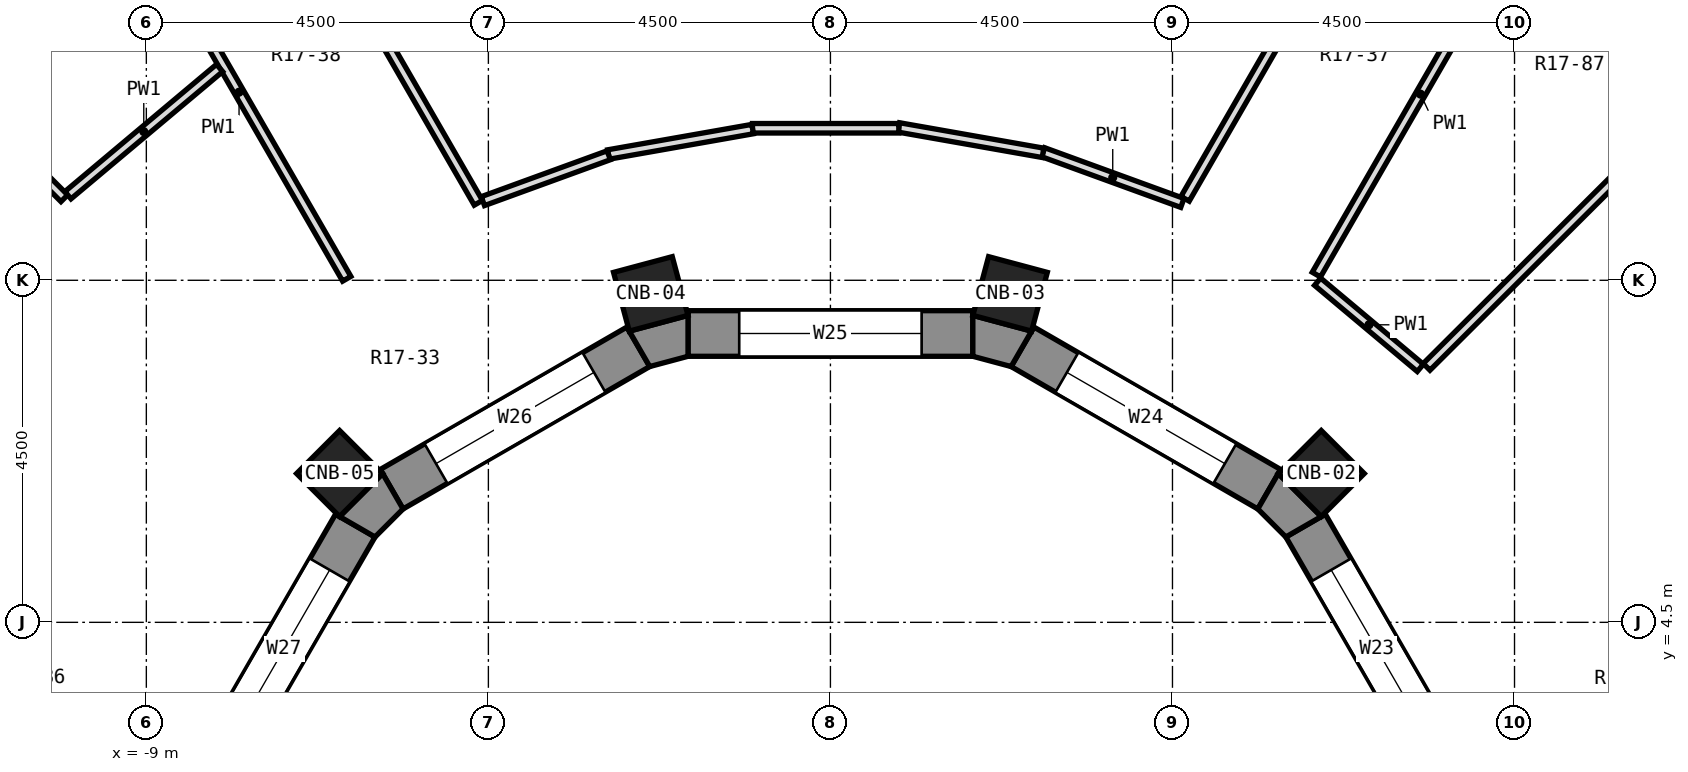
"""IFC4 building model, lengths in metres.
Left out: names, types, materials, properties, quantities, classifications, styles, units other than length and angle.
Written with IfcOpenShell. Run it as: python <this file> out.ifc"""

import sys

from ifc_helpers import new_model, si_unit, direction, frame, frame_2d, origin, origin_2d, place, context, subcontext, project, spatial, polyline, rectangle, outline, extrude, element, fill, save


model = new_model("IFC4")
c1 = context("Model", 3, precision=1e-05, world=origin(), true_north=direction((0.0, 1.0)))
c2 = subcontext(c1, "Body", "Model", "MODEL_VIEW")
j1 = project(units=[si_unit("LENGTHUNIT", "METRE"), si_unit("PLANEANGLEUNIT", "RADIAN")], contexts=[c1])
p1 = place(None, origin())
s1 = spatial("IfcSite", under=j1, at=p1, CompositionType="ELEMENT")
p2 = place(p1, origin())
s2 = spatial("IfcBuilding", under=s1, at=p2, CompositionType="ELEMENT")
p3 = place(p2, frame((0.0, 0.0, 91.9)))
s3 = spatial("IfcBuildingStorey", under=s2, at=p3, CompositionType="ELEMENT", Elevation=91.9)
for number, where, z_axis, x_axis in (
    (1, (6.458, 6.458, 0.0), (0.0, 0.0, 1.0), (0.707, 0.707, 0.0)),
    (2, (2.364, 8.821, 0.0), (0.0, 0.0, 1.0), (0.259, 0.966, 0.0)),
    (3, (-2.364, 8.821, 0.0), (0.0, 0.0, 1.0), (-0.259, 0.966, 0.0)),
    (4, (-6.458, 6.458, 0.0), (0.0, 0.0, 1.0), (-0.707, 0.707, 0.0)),
):
    element("IfcColumn", number, at=place(p3, frame(where, z_axis=z_axis, x_axis=x_axis)), inside=s3, PredefinedType="COLUMN", context=c2, shape_type="SweptSolid", body=[
        extrude(rectangle(XDim=0.8, YDim=0.8, at=origin_2d()), origin(), (0.0, 0.0, 1.0), 3.3),
    ])
p4 = place(p3, frame((8.125, 2.527, 0.0), z_axis=(0.0, 0.0, 1.0), x_axis=(-0.499964958637, 0.86604563398, 0.0)))
e5 = element("IfcWall", 5, at=p4, inside=s3, PredefinedType="SOLIDWALL", context=c2, shape_type="SweptSolid", body=[
    extrude(rectangle(XDim=3.747, YDim=0.6, at=frame_2d((1.874, 0.0))), origin(), (0.0, 0.0, 1.0), 2.8),
])
p5 = place(p4, frame((0.674, 0.0, 0.9)))
e6 = element("IfcOpeningElement", 6, at=p5, cuts=e5, PredefinedType="OPENING", context=c2, shape_type="SweptSolid", body=[
    extrude(rectangle(XDim=2.4, YDim=1.8, at=frame_2d((1.2, 0.9))), frame((0.0, 0.312, 0.0), z_axis=(0.0, -1.0, 0.0), x_axis=(1.0, 0.0, 0.0)), (0.0, 0.0, 1.0), 0.624),
])
p6 = place(p3, frame((5.773, 6.251, 0.0), z_axis=(0.0, 0.0, 1.0), x_axis=(-0.86604563398, 0.499964958637, 0.0)))
e7 = element("IfcWall", 7, at=p6, inside=s3, PredefinedType="SOLIDWALL", context=c2, shape_type="SweptSolid", body=[
    extrude(rectangle(XDim=3.747, YDim=0.6, at=frame_2d((1.874, 0.0))), origin(), (0.0, 0.0, 1.0), 2.8),
])
p7 = place(p6, frame((0.674, 0.0, 0.9)))
e8 = element("IfcOpeningElement", 8, at=p7, cuts=e7, PredefinedType="OPENING", context=c2, shape_type="SweptSolid", body=[
    extrude(rectangle(XDim=2.4, YDim=1.8, at=frame_2d((1.2, 0.9))), frame((0.0, 0.312, 0.0), z_axis=(0.0, -1.0, 0.0), x_axis=(1.0, 0.0, 0.0)), (0.0, 0.0, 1.0), 0.624),
])
p8 = place(p3, frame((1.874, 8.3, 0.0), z_axis=(0.0, 0.0, 1.0), x_axis=(-1.0, 0.0, 0.0)))
e9 = element("IfcWall", 9, at=p8, inside=s3, PredefinedType="SOLIDWALL", context=c2, shape_type="SweptSolid", body=[
    extrude(rectangle(XDim=3.748, YDim=0.6, at=frame_2d((1.874, 0.0))), origin(), (0.0, 0.0, 1.0), 2.8),
])
p9 = place(p8, frame((0.674, 0.0, 0.9)))
e10 = element("IfcOpeningElement", 10, at=p9, cuts=e9, PredefinedType="OPENING", context=c2, shape_type="SweptSolid", body=[
    extrude(rectangle(XDim=2.4, YDim=1.8, at=frame_2d((1.2, 0.9))), frame((0.0, 0.312, 0.0), z_axis=(0.0, -1.0, 0.0), x_axis=(1.0, 0.0, 0.0)), (0.0, 0.0, 1.0), 0.624),
])
p10 = place(p3, frame((-2.527, 8.125, 0.0), z_axis=(0.0, 0.0, 1.0), x_axis=(-0.86604563398, -0.499964958637, 0.0)))
e11 = element("IfcWall", 11, at=p10, inside=s3, PredefinedType="SOLIDWALL", context=c2, shape_type="SweptSolid", body=[
    extrude(rectangle(XDim=3.747, YDim=0.6, at=frame_2d((1.874, 0.0))), origin(), (0.0, 0.0, 1.0), 2.8),
])
p11 = place(p10, frame((0.674, 0.0, 0.9)))
e12 = element("IfcOpeningElement", 12, at=p11, cuts=e11, PredefinedType="OPENING", context=c2, shape_type="SweptSolid", body=[
    extrude(rectangle(XDim=2.4, YDim=1.8, at=frame_2d((1.2, 0.9))), frame((0.0, 0.312, 0.0), z_axis=(0.0, -1.0, 0.0), x_axis=(1.0, 0.0, 0.0)), (0.0, 0.0, 1.0), 0.624),
])
p12 = place(p3, frame((-6.251, 5.773, 0.0), z_axis=(0.0, 0.0, 1.0), x_axis=(-0.499964958637, -0.86604563398, 0.0)))
e13 = element("IfcWall", 13, at=p12, inside=s3, PredefinedType="SOLIDWALL", context=c2, shape_type="SweptSolid", body=[
    extrude(rectangle(XDim=3.747, YDim=0.6, at=frame_2d((1.874, 0.0))), origin(), (0.0, 0.0, 1.0), 2.8),
])
p13 = place(p12, frame((0.674, 0.0, 0.9)))
e14 = element("IfcOpeningElement", 14, at=p13, cuts=e13, PredefinedType="OPENING", context=c2, shape_type="SweptSolid", body=[
    extrude(rectangle(XDim=2.4, YDim=1.8, at=frame_2d((1.2, 0.9))), frame((0.0, 0.312, 0.0), z_axis=(0.0, -1.0, 0.0), x_axis=(1.0, 0.0, 0.0)), (0.0, 0.0, 1.0), 0.624),
])
p14 = place(p3, origin())
e15 = element("IfcWall", 15, at=p14, inside=s3, PredefinedType="SOLIDWALL", context=c2, shape_type="SweptSolid", body=[
    extrude(outline(polyline([(5.892, 6.458), (5.623, 5.991), (5.991, 5.623), (6.458, 5.892), (5.892, 6.458)])), origin(), (0.0, 0.0, 1.0), 2.8),
])
p15 = place(p3, origin())
e16 = element("IfcWall", 16, at=p15, inside=s3, PredefinedType="SOLIDWALL", context=c2, shape_type="SweptSolid", body=[
    extrude(outline(polyline([(1.874, 8.538), (1.874, 8.0), (2.377, 7.865), (2.646, 8.331), (1.874, 8.538)])), origin(), (0.0, 0.0, 1.0), 2.8),
])
p16 = place(p3, origin())
e17 = element("IfcWall", 17, at=p16, inside=s3, PredefinedType="SOLIDWALL", context=c2, shape_type="SweptSolid", body=[
    extrude(outline(polyline([(-2.646, 8.331), (-2.377, 7.865), (-1.874, 8.0), (-1.874, 8.538), (-2.646, 8.331)])), origin(), (0.0, 0.0, 1.0), 2.8),
])
p17 = place(p3, origin())
e18 = element("IfcWall", 18, at=p17, inside=s3, PredefinedType="SOLIDWALL", context=c2, shape_type="SweptSolid", body=[
    extrude(outline(polyline([(-6.458, 5.892), (-5.991, 5.623), (-5.623, 5.991), (-5.892, 6.458), (-6.458, 5.892)])), origin(), (0.0, 0.0, 1.0), 2.8),
])
p18 = place(p3, frame((-9.197, 13.93, 0.0), z_axis=(0.0, 0.0, 1.0), x_axis=(0.499811918813, -0.86613396528, 0.0)))
e19 = element("IfcWall", 19, at=p18, inside=s3, PredefinedType="PARTITIONING", context=c2, shape_type="SweptSolid", body=[
    extrude(rectangle(XDim=5.67, YDim=0.125, at=frame_2d((2.835, 0.0))), origin(), (0.0, 0.0, 1.0), 2.8),
])
p19 = place(p3, frame((-7.434, 14.876, 0.0), z_axis=(0.0, 0.0, 1.0), x_axis=(0.499750096908, -0.866169637335, 0.0)))
e20 = element("IfcWall", 20, at=p19, inside=s3, PredefinedType="PARTITIONING", context=c2, shape_type="SweptSolid", body=[
    extrude(rectangle(XDim=5.607, YDim=0.125, at=frame_2d((2.803, 0.0))), origin(), (0.0, 0.0, 1.0), 2.8),
])
p20 = place(p19, frame((0.837, 0.0, 0.0)))
e21 = element("IfcOpeningElement", 21, at=p20, cuts=e20, PredefinedType="OPENING", context=c2, shape_type="SweptSolid", body=[
    extrude(rectangle(XDim=1.0, YDim=2.1, at=frame_2d((0.5, 1.05))), frame((0.0, 0.074, 0.0), z_axis=(0.0, -1.0, 0.0), x_axis=(1.0, 0.0, 0.0)), (0.0, 0.0, 1.0), 0.149),
])
p21 = place(p3, frame((-13.079, 13.079, 0.0), z_axis=(0.0, 0.0, 1.0), x_axis=(0.707106781187, -0.707106781187, 0.0)))
e22 = element("IfcWall", 22, at=p21, inside=s3, PredefinedType="PARTITIONING", context=c2, shape_type="SweptSolid", body=[
    extrude(rectangle(XDim=4.242, YDim=0.125, at=frame_2d((2.121, 0.0))), origin(), (0.0, 0.0, 1.0), 2.8),
])
p22 = place(p3, frame((6.409, 8.981, 0.0), z_axis=(0.0, 0.0, 1.0), x_axis=(0.766209131969, -0.642591290081, 0.0)))
e23 = element("IfcWall", 23, at=p22, inside=s3, PredefinedType="PARTITIONING", context=c2, shape_type="SweptSolid", body=[
    extrude(rectangle(XDim=1.764, YDim=0.125, at=frame_2d((0.882, 0.0))), origin(), (0.0, 0.0, 1.0), 2.8),
])
p23 = place(p3, frame((2.798, 10.685, 0.0), z_axis=(0.0, 0.0, 1.0), x_axis=(0.939595877431, -0.342285826635, 0.0)))
e24 = element("IfcWall", 24, at=p23, inside=s3, PredefinedType="PARTITIONING", context=c2, shape_type="SweptSolid", body=[
    extrude(rectangle(XDim=1.95, YDim=0.125, at=frame_2d((0.975, 0.0))), origin(), (0.0, 0.0, 1.0), 2.8),
])
p24 = place(p3, frame((0.899, 11.011, 0.0), z_axis=(0.0, 0.0, 1.0), x_axis=(0.984830733923, -0.173517795977, 0.0)))
e25 = element("IfcWall", 25, at=p24, inside=s3, PredefinedType="PARTITIONING", context=c2, shape_type="SweptSolid", body=[
    extrude(rectangle(XDim=1.926, YDim=0.125, at=frame_2d((0.963, 0.0))), origin(), (0.0, 0.0, 1.0), 2.8),
])
p25 = place(p3, frame((-1.025, 11.0, 0.0), z_axis=(0.0, 0.0, 1.0), x_axis=(1.0, 0.0, 0.0)))
e26 = element("IfcWall", 26, at=p25, inside=s3, PredefinedType="PARTITIONING", context=c2, shape_type="SweptSolid", body=[
    extrude(rectangle(XDim=1.925, YDim=0.125, at=frame_2d((0.962, 0.0))), origin(), (0.0, 0.0, 1.0), 2.8),
])
p26 = place(p3, frame((-2.92, 10.655, 0.0), z_axis=(0.0, 0.0, 1.0), x_axis=(0.98482691703, 0.173539458027, 0.0)))
e27 = element("IfcWall", 27, at=p26, inside=s3, PredefinedType="PARTITIONING", context=c2, shape_type="SweptSolid", body=[
    extrude(rectangle(XDim=1.926, YDim=0.125, at=frame_2d((0.963, 0.0))), origin(), (0.0, 0.0, 1.0), 2.8),
])
p27 = place(p3, frame((-4.572, 10.042, 0.0), z_axis=(0.0, 0.0, 1.0), x_axis=(0.939578855371, 0.342332549635, 0.0)))
e28 = element("IfcWall", 28, at=p27, inside=s3, PredefinedType="PARTITIONING", context=c2, shape_type="SweptSolid", body=[
    extrude(rectangle(XDim=1.762, YDim=0.125, at=frame_2d((0.881, 0.0))), origin(), (0.0, 0.0, 1.0), 2.8),
])
p28 = place(p3, frame((-10.031, 10.119, 0.0), z_axis=(0.0, 0.0, 1.0), x_axis=(0.766096242005, 0.642725873126, 0.0)))
e29 = element("IfcWall", 29, at=p28, inside=s3, PredefinedType="PARTITIONING", context=c2, shape_type="SweptSolid", body=[
    extrude(rectangle(XDim=2.604, YDim=0.125, at=frame_2d((1.302, 0.0))), origin(), (0.0, 0.0, 1.0), 2.8),
])
p29 = place(p3, frame((7.844, 7.861, 0.0), z_axis=(0.0, 0.0, 1.0), x_axis=(0.708356490253, 0.705854859526, 0.0)))
e30 = element("IfcWall", 30, at=p29, inside=s3, PredefinedType="PARTITIONING", context=c2, shape_type="SweptSolid", body=[
    extrude(rectangle(XDim=7.417, YDim=0.125, at=frame_2d((3.708, 0.0))), origin(), (0.0, 0.0, 1.0), 2.8),
])
p30 = place(p3, frame((6.393, 9.075, 0.0), z_axis=(0.0, 0.0, 1.0), x_axis=(0.499717313028, 0.866188551679, 0.0)))
e31 = element("IfcWall", 31, at=p30, inside=s3, PredefinedType="PARTITIONING", context=c2, shape_type="SweptSolid", body=[
    extrude(rectangle(XDim=5.482, YDim=0.125, at=frame_2d((2.741, 0.0))), origin(), (0.0, 0.0, 1.0), 2.8),
])
p31 = place(p3, frame((4.666, 10.072, 0.0), z_axis=(0.0, 0.0, 1.0), x_axis=(0.499564368271, 0.866276769834, 0.0)))
e32 = element("IfcWall", 32, at=p31, inside=s3, PredefinedType="PARTITIONING", context=c2, shape_type="SweptSolid", body=[
    extrude(rectangle(XDim=5.482, YDim=0.125, at=frame_2d((2.741, 0.0))), origin(), (0.0, 0.0, 1.0), 2.8),
])
p32 = place(p5, origin())
e33 = element("IfcWindow", 33, at=p32, inside=s3, PartitioningType="SINGLE_PANEL", PredefinedType="WINDOW", context=c2, shape_type="SweptSolid", body=[
    extrude(rectangle(XDim=2.4, YDim=1.8, at=frame_2d((1.2, 0.9))), frame((0.0, -0.12, 0.0), z_axis=(0.0, -1.0, 0.0), x_axis=(1.0, 0.0, 0.0)), (0.0, 0.0, 1.0), 0.06),
])
fill(e6, e33)
p33 = place(p7, origin())
e34 = element("IfcWindow", 34, at=p33, inside=s3, PartitioningType="SINGLE_PANEL", PredefinedType="WINDOW", context=c2, shape_type="SweptSolid", body=[
    extrude(rectangle(XDim=2.4, YDim=1.8, at=frame_2d((1.2, 0.9))), frame((0.0, -0.12, 0.0), z_axis=(0.0, -1.0, 0.0), x_axis=(1.0, 0.0, 0.0)), (0.0, 0.0, 1.0), 0.06),
])
fill(e8, e34)
p34 = place(p9, origin())
e35 = element("IfcWindow", 35, at=p34, inside=s3, PartitioningType="SINGLE_PANEL", PredefinedType="WINDOW", context=c2, shape_type="SweptSolid", body=[
    extrude(rectangle(XDim=2.4, YDim=1.8, at=frame_2d((1.2, 0.9))), frame((0.0, -0.12, 0.0), z_axis=(0.0, -1.0, 0.0), x_axis=(1.0, 0.0, 0.0)), (0.0, 0.0, 1.0), 0.06),
])
fill(e10, e35)
p35 = place(p11, origin())
e36 = element("IfcWindow", 36, at=p35, inside=s3, PartitioningType="SINGLE_PANEL", PredefinedType="WINDOW", context=c2, shape_type="SweptSolid", body=[
    extrude(rectangle(XDim=2.4, YDim=1.8, at=frame_2d((1.2, 0.9))), frame((0.0, -0.12, 0.0), z_axis=(0.0, -1.0, 0.0), x_axis=(1.0, 0.0, 0.0)), (0.0, 0.0, 1.0), 0.06),
])
fill(e12, e36)
p36 = place(p13, origin())
e37 = element("IfcWindow", 37, at=p36, inside=s3, PartitioningType="SINGLE_PANEL", PredefinedType="WINDOW", context=c2, shape_type="SweptSolid", body=[
    extrude(rectangle(XDim=2.4, YDim=1.8, at=frame_2d((1.2, 0.9))), frame((0.0, -0.12, 0.0), z_axis=(0.0, -1.0, 0.0), x_axis=(1.0, 0.0, 0.0)), (0.0, 0.0, 1.0), 0.06),
])
fill(e14, e37)
save(model, sys.argv[1])
